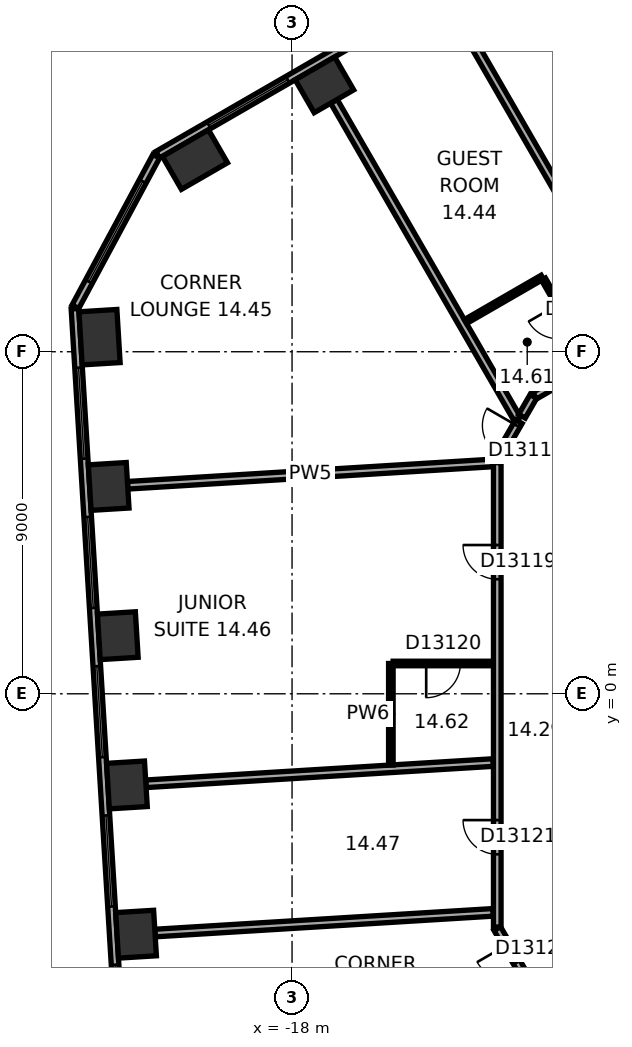
"""IFC4 building model, lengths in metres.
Left out: names, types, materials, properties, quantities, classifications, styles, units other than length and angle.
Written with IfcOpenShell. Run it as: python <this file> out.ifc"""

import sys

from ifc_helpers import new_model, si_unit, direction, frame, frame_2d, origin, origin_2d, place, context, subcontext, project, spatial, rectangle, extrude, element, fill, save


model = new_model("IFC4")
c1 = context("Model", 3, precision=1e-05, world=origin(), true_north=direction((0.0, 1.0)))
c2 = subcontext(c1, "Body", "Model", "MODEL_VIEW")
j1 = project(units=[si_unit("LENGTHUNIT", "METRE"), si_unit("PLANEANGLEUNIT", "RADIAN")], contexts=[c1])
p1 = place(None, origin())
s1 = spatial("IfcSite", under=j1, at=p1, CompositionType="ELEMENT")
p2 = place(p1, origin())
s2 = spatial("IfcBuilding", under=s1, at=p2, CompositionType="ELEMENT")
p3 = place(p2, frame((0.0, 0.0, 67.1)))
s3 = spatial("IfcBuildingStorey", under=s2, at=p3, CompositionType="ELEMENT", Elevation=67.1)
p4 = place(p3, frame((-17.148, 16.023, 0.0), z_axis=(0.0, 0.0, 1.0), x_axis=(-0.866025403784, -0.5, 0.0)))
e1 = element("IfcColumn", 1, at=p4, inside=s3, PredefinedType="COLUMN", context=c2, shape_type="SweptSolid", body=[
    extrude(rectangle(XDim=1.2, YDim=1.0, at=origin_2d()), origin(), (0.0, 0.0, 1.0), 3.3),
])
for number, where, z_axis, x_axis in (
    (2, (-20.555, 14.055, 0.0), (0.0, 0.0, 1.0), (-0.866, -0.5, 0.0)),
    (3, (-23.066, 9.383, 0.0), (0.0, 0.0, 1.0), (0.061, -0.998, 0.0)),
):
    element("IfcColumn", number, at=place(p3, frame(where, z_axis=z_axis, x_axis=x_axis)), inside=s3, PredefinedType="COLUMN", context=c2, shape_type="SweptSolid", body=[
        extrude(rectangle(XDim=1.4, YDim=1.0, at=origin_2d()), origin(), (0.0, 0.0, 1.0), 3.3),
    ])
for number, where, z_axis, x_axis in (
    (4, (-22.826, 5.456, 0.0), (0.0, 0.0, 1.0), (0.061, -0.998, 0.0)),
    (5, (-22.585, 1.529, 0.0), (0.0, 0.0, 1.0), (0.061, -0.998, 0.0)),
    (6, (-22.345, -2.399, 0.0), (0.0, 0.0, 1.0), (0.061, -0.998, 0.0)),
    (7, (-22.105, -6.326, 0.0), (0.0, 0.0, 1.0), (0.061, -0.998, 0.0)),
):
    element("IfcColumn", number, at=place(p3, frame(where, z_axis=z_axis, x_axis=x_axis)), inside=s3, PredefinedType="COLUMN", context=c2, shape_type="SweptSolid", body=[
        extrude(rectangle(XDim=1.2, YDim=1.0, at=origin_2d()), origin(), (0.0, 0.0, 1.0), 3.3),
    ])
p5 = place(p3, frame((-3.136, 24.805, 0.0), z_axis=(0.0, 0.0, 1.0), x_axis=(-0.866028291626, -0.499994998079, 0.0)))
e8 = element("IfcWall", 8, at=p5, inside=s3, PredefinedType="STANDARD", context=c2, shape_type="SweptSolid", body=[
    extrude(rectangle(XDim=21.246, YDim=0.2, at=frame_2d((10.623, 0.0))), origin(), (0.0, 0.0, 1.0), 3.3),
])
p6 = place(p5, frame((1.555, 0.0, 0.8)))
e9 = element("IfcOpeningElement", 9, at=p6, cuts=e8, PredefinedType="OPENING", context=c2, shape_type="SweptSolid", body=[
    extrude(rectangle(XDim=2.4, YDim=1.7, at=frame_2d((1.2, 0.85))), frame((0.0, 0.11, 0.0), z_axis=(0.0, -1.0, 0.0), x_axis=(1.0, 0.0, 0.0)), (0.0, 0.0, 1.0), 0.22),
])
p7 = place(p5, frame((5.489, 0.0, 0.8)))
e10 = element("IfcOpeningElement", 10, at=p7, cuts=e8, PredefinedType="OPENING", context=c2, shape_type="SweptSolid", body=[
    extrude(rectangle(XDim=2.4, YDim=1.7, at=frame_2d((1.2, 0.85))), frame((0.0, 0.11, 0.0), z_axis=(0.0, -1.0, 0.0), x_axis=(1.0, 0.0, 0.0)), (0.0, 0.0, 1.0), 0.22),
])
p8 = place(p5, frame((9.424, 0.0, 0.8)))
e11 = element("IfcOpeningElement", 11, at=p8, cuts=e8, PredefinedType="OPENING", context=c2, shape_type="SweptSolid", body=[
    extrude(rectangle(XDim=2.4, YDim=1.7, at=frame_2d((1.2, 0.85))), frame((0.0, 0.11, 0.0), z_axis=(0.0, -1.0, 0.0), x_axis=(1.0, 0.0, 0.0)), (0.0, 0.0, 1.0), 0.22),
])
p9 = place(p5, frame((13.358, 0.0, 0.8)))
e12 = element("IfcOpeningElement", 12, at=p9, cuts=e8, PredefinedType="OPENING", context=c2, shape_type="SweptSolid", body=[
    extrude(rectangle(XDim=2.4, YDim=1.7, at=frame_2d((1.2, 0.85))), frame((0.0, 0.11, 0.0), z_axis=(0.0, -1.0, 0.0), x_axis=(1.0, 0.0, 0.0)), (0.0, 0.0, 1.0), 0.22),
])
p10 = place(p5, frame((17.293, 0.0, 0.8)))
e13 = element("IfcOpeningElement", 13, at=p10, cuts=e8, PredefinedType="OPENING", context=c2, shape_type="SweptSolid", body=[
    extrude(rectangle(XDim=2.4, YDim=1.7, at=frame_2d((1.2, 0.85))), frame((0.0, 0.11, 0.0), z_axis=(0.0, -1.0, 0.0), x_axis=(1.0, 0.0, 0.0)), (0.0, 0.0, 1.0), 0.22),
])
p11 = place(p3, frame((-21.574, 14.143, 0.0), z_axis=(0.0, 0.0, 1.0), x_axis=(-0.473292949472, -0.880905093628, 0.0)))
e14 = element("IfcWall", 14, at=p11, inside=s3, PredefinedType="STANDARD", context=c2, shape_type="SweptSolid", body=[
    extrude(rectangle(XDim=4.494, YDim=0.2, at=frame_2d((2.247, 0.0))), origin(), (0.0, 0.0, 1.0), 3.3),
])
p12 = place(p11, frame((0.747, 0.0, 0.8)))
e15 = element("IfcOpeningElement", 15, at=p12, cuts=e14, PredefinedType="OPENING", context=c2, shape_type="SweptSolid", body=[
    extrude(rectangle(XDim=3.0, YDim=1.7, at=frame_2d((1.5, 0.85))), frame((0.0, 0.11, 0.0), z_axis=(0.0, -1.0, 0.0), x_axis=(1.0, 0.0, 0.0)), (0.0, 0.0, 1.0), 0.22),
])
p13 = place(p3, frame((-23.713, 10.131, 0.0), z_axis=(0.0, 0.0, 1.0), x_axis=(0.061040439785, -0.998135293791, 0.0)))
e16 = element("IfcWall", 16, at=p13, inside=s3, PredefinedType="STANDARD", context=c2, shape_type="SweptSolid", body=[
    extrude(rectangle(XDim=21.246, YDim=0.2, at=frame_2d((10.623, 0.0))), origin(), (0.0, 0.0, 1.0), 3.3),
])
p14 = place(p13, frame((1.553, 0.0, 0.8)))
e17 = element("IfcOpeningElement", 17, at=p14, cuts=e16, PredefinedType="OPENING", context=c2, shape_type="SweptSolid", body=[
    extrude(rectangle(XDim=2.4, YDim=1.7, at=frame_2d((1.2, 0.85))), frame((0.0, 0.11, 0.0), z_axis=(0.0, -1.0, 0.0), x_axis=(1.0, 0.0, 0.0)), (0.0, 0.0, 1.0), 0.22),
])
p15 = place(p13, frame((5.488, 0.0, 0.8)))
e18 = element("IfcOpeningElement", 18, at=p15, cuts=e16, PredefinedType="OPENING", context=c2, shape_type="SweptSolid", body=[
    extrude(rectangle(XDim=2.4, YDim=1.7, at=frame_2d((1.2, 0.85))), frame((0.0, 0.11, 0.0), z_axis=(0.0, -1.0, 0.0), x_axis=(1.0, 0.0, 0.0)), (0.0, 0.0, 1.0), 0.22),
])
p16 = place(p13, frame((9.422, 0.0, 0.8)))
e19 = element("IfcOpeningElement", 19, at=p16, cuts=e16, PredefinedType="OPENING", context=c2, shape_type="SweptSolid", body=[
    extrude(rectangle(XDim=2.4, YDim=1.7, at=frame_2d((1.2, 0.85))), frame((0.0, 0.11, 0.0), z_axis=(0.0, -1.0, 0.0), x_axis=(1.0, 0.0, 0.0)), (0.0, 0.0, 1.0), 0.22),
])
p17 = place(p13, frame((13.357, 0.0, 0.8)))
e20 = element("IfcOpeningElement", 20, at=p17, cuts=e16, PredefinedType="OPENING", context=c2, shape_type="SweptSolid", body=[
    extrude(rectangle(XDim=2.4, YDim=1.7, at=frame_2d((1.2, 0.85))), frame((0.0, 0.11, 0.0), z_axis=(0.0, -1.0, 0.0), x_axis=(1.0, 0.0, 0.0)), (0.0, 0.0, 1.0), 0.22),
])
p18 = place(p13, frame((17.292, 0.0, 0.8)))
e21 = element("IfcOpeningElement", 21, at=p18, cuts=e16, PredefinedType="OPENING", context=c2, shape_type="SweptSolid", body=[
    extrude(rectangle(XDim=2.4, YDim=1.7, at=frame_2d((1.2, 0.85))), frame((0.0, 0.11, 0.0), z_axis=(0.0, -1.0, 0.0), x_axis=(1.0, 0.0, 0.0)), (0.0, 0.0, 1.0), 0.22),
])
p19 = place(p3, frame((-22.327, 5.486, 0.0), z_axis=(0.0, 0.0, 1.0), x_axis=(0.998135194863, 0.061042057435, 0.0)))
e22 = element("IfcWall", 22, at=p19, inside=s3, PredefinedType="PARTITIONING", context=c2, shape_type="SweptSolid", body=[
    extrude(rectangle(XDim=9.635, YDim=0.2, at=frame_2d((4.817, 0.0))), origin(), (0.0, 0.0, 1.0), 3.05),
])
p20 = place(p3, frame((-21.846, -2.368, 0.0), z_axis=(0.0, 0.0, 1.0), x_axis=(0.998134617584, 0.061051496129, 0.0)))
e23 = element("IfcWall", 23, at=p20, inside=s3, PredefinedType="PARTITIONING", context=c2, shape_type="SweptSolid", body=[
    extrude(rectangle(XDim=9.154, YDim=0.2, at=frame_2d((4.577, 0.0))), origin(), (0.0, 0.0, 1.0), 3.05),
])
p21 = place(p3, frame((-21.606, -6.295, 0.0), z_axis=(0.0, 0.0, 1.0), x_axis=(0.998134305525, 0.061056597794, 0.0)))
e24 = element("IfcWall", 24, at=p21, inside=s3, PredefinedType="PARTITIONING", context=c2, shape_type="SweptSolid", body=[
    extrude(rectangle(XDim=8.913, YDim=0.2, at=frame_2d((4.457, 0.0))), origin(), (0.0, 0.0, 1.0), 2.6),
])
p22 = place(p3, frame((-16.898, 15.59, 0.0), z_axis=(0.0, 0.0, 1.0), x_axis=(0.499994742786, -0.866028439017, 0.0)))
e25 = element("IfcWall", 25, at=p22, inside=s3, PredefinedType="PARTITIONING", context=c2, shape_type="SweptSolid", body=[
    extrude(rectangle(XDim=9.65, YDim=0.2, at=frame_2d((4.825, 0.0))), origin(), (0.0, 0.0, 1.0), 3.05),
])
p23 = place(p3, frame((-15.4, -1.874, 0.0), z_axis=(0.0, 0.0, 1.0), x_axis=(0.0, 1.0, 0.0)))
e26 = element("IfcWall", 26, at=p23, inside=s3, PredefinedType="PARTITIONING", context=c2, shape_type="SweptSolid", body=[
    extrude(rectangle(XDim=2.671, YDim=0.12, at=frame_2d((1.335, 0.0))), origin(), (0.0, 0.0, 1.0), 3.05),
])
p24 = place(p3, frame((-15.34, 0.797, 0.0), z_axis=(0.0, 0.0, 1.0), x_axis=(1.0, 0.0, 0.0)))
e27 = element("IfcWall", 27, at=p24, inside=s3, PredefinedType="PARTITIONING", context=c2, shape_type="SweptSolid", body=[
    extrude(rectangle(XDim=2.64, YDim=0.12, at=frame_2d((1.32, 0.0))), origin(), (0.0, 0.0, 1.0), 2.6),
])
p25 = place(p24, frame((0.87, 0.0, 0.0)))
e28 = element("IfcOpeningElement", 28, at=p25, cuts=e27, PredefinedType="OPENING", context=c2, shape_type="SweptSolid", body=[
    extrude(rectangle(XDim=0.9, YDim=2.1, at=frame_2d((0.45, 1.05))), frame((0.0, 0.07, 0.0), z_axis=(0.0, -1.0, 0.0), x_axis=(1.0, 0.0, 0.0)), (0.0, 0.0, 1.0), 0.14),
])
p26 = place(p3, frame((-13.436, 9.794, 0.0), z_axis=(0.0, 0.0, 1.0), x_axis=(0.866053246676, 0.499951771596, 0.0)))
e29 = element("IfcWall", 29, at=p26, inside=s3, PredefinedType="PARTITIONING", context=c2, shape_type="SweptSolid", body=[
    extrude(rectangle(XDim=2.335, YDim=0.12, at=frame_2d((1.167, 0.0))), origin(), (0.0, 0.0, 1.0), 3.05),
])
p27 = place(p3, frame((-12.6, -6.177, 0.0), z_axis=(0.0, 0.0, 1.0), x_axis=(0.500063520245, -0.865988727248, 0.0)))
e30 = element("IfcWall", 30, at=p27, inside=s3, PredefinedType="PARTITIONING", context=c2, shape_type="SweptSolid", body=[
    extrude(rectangle(XDim=1.9, YDim=0.2, at=frame_2d((0.95, 0.0))), origin(), (0.0, 0.0, 1.0), 3.05),
])
p28 = place(p27, frame((0.5, 0.0, 0.0)))
e31 = element("IfcOpeningElement", 31, at=p28, cuts=e30, PredefinedType="OPENING", context=c2, shape_type="SweptSolid", body=[
    extrude(rectangle(XDim=0.9, YDim=2.1, at=frame_2d((0.45, 1.05))), frame((0.0, 0.11, 0.0), z_axis=(0.0, -1.0, 0.0), x_axis=(1.0, 0.0, 0.0)), (0.0, 0.0, 1.0), 0.22),
])
p29 = place(p3, frame((-12.6, 6.081, 0.0), z_axis=(0.0, 0.0, 1.0), x_axis=(0.0, -1.0, 0.0)))
e32 = element("IfcWall", 32, at=p29, inside=s3, PredefinedType="PARTITIONING", context=c2, shape_type="SweptSolid", body=[
    extrude(rectangle(XDim=12.219, YDim=0.2, at=frame_2d((6.109, 0.0))), origin(), (0.0, 0.0, 1.0), 3.05),
])
p30 = place(p29, frame((2.167, 0.0, 0.0)))
e33 = element("IfcOpeningElement", 33, at=p30, cuts=e32, PredefinedType="OPENING", context=c2, shape_type="SweptSolid", body=[
    extrude(rectangle(XDim=0.9, YDim=2.1, at=frame_2d((0.45, 1.05))), frame((0.0, 0.11, 0.0), z_axis=(0.0, -1.0, 0.0), x_axis=(1.0, 0.0, 0.0)), (0.0, 0.0, 1.0), 0.22),
])
p31 = place(p29, frame((9.405, 0.0, 0.0)))
e34 = element("IfcOpeningElement", 34, at=p31, cuts=e32, PredefinedType="OPENING", context=c2, shape_type="SweptSolid", body=[
    extrude(rectangle(XDim=0.9, YDim=2.1, at=frame_2d((0.45, 1.05))), frame((0.0, 0.11, 0.0), z_axis=(0.0, -1.0, 0.0), x_axis=(1.0, 0.0, 0.0)), (0.0, 0.0, 1.0), 0.22),
])
p32 = place(p3, frame((-12.032, 7.162, 0.0), z_axis=(0.0, 0.0, 1.0), x_axis=(-0.499951829968, -0.866053212979, 0.0)))
e35 = element("IfcWall", 35, at=p32, inside=s3, PredefinedType="PARTITIONING", context=c2, shape_type="SweptSolid", body=[
    extrude(rectangle(XDim=1.136, YDim=0.2, at=frame_2d((0.568, 0.0))), origin(), (0.0, 0.0, 1.0), 3.05),
])
p33 = place(p32, frame((0.118, 0.0, 0.0)))
e36 = element("IfcOpeningElement", 36, at=p33, cuts=e35, PredefinedType="OPENING", context=c2, shape_type="SweptSolid", body=[
    extrude(rectangle(XDim=0.9, YDim=2.1, at=frame_2d((0.45, 1.05))), frame((0.0, 0.11, 0.0), z_axis=(0.0, -1.0, 0.0), x_axis=(1.0, 0.0, 0.0)), (0.0, 0.0, 1.0), 0.22),
])
p34 = place(p3, frame((-11.65, 7.823, 0.0), z_axis=(0.0, 0.0, 1.0), x_axis=(-0.50012165622, -0.865955154139, 0.0)))
e37 = element("IfcWall", 37, at=p34, inside=s3, PredefinedType="PARTITIONING", context=c2, shape_type="SweptSolid", body=[
    extrude(rectangle(XDim=0.6, YDim=0.2, at=frame_2d((0.3, 0.0))), origin(), (0.0, 0.0, 1.0), 3.05),
])
p35 = place(p3, frame((-11.385, 10.909, 0.0), z_axis=(0.0, 0.0, 1.0), x_axis=(0.500077547548, -0.865980627057, 0.0)))
e38 = element("IfcWall", 38, at=p35, inside=s3, PredefinedType="PARTITIONING", context=c2, shape_type="SweptSolid", body=[
    extrude(rectangle(XDim=2.44, YDim=0.12, at=frame_2d((1.22, 0.0))), origin(), (0.0, 0.0, 1.0), 3.05),
])
p36 = place(p35, frame((0.77, 0.0, 0.0)))
e39 = element("IfcOpeningElement", 39, at=p36, cuts=e38, PredefinedType="OPENING", context=c2, shape_type="SweptSolid", body=[
    extrude(rectangle(XDim=0.9, YDim=2.1, at=frame_2d((0.45, 1.05))), frame((0.0, 0.07, 0.0), z_axis=(0.0, -1.0, 0.0), x_axis=(1.0, 0.0, 0.0)), (0.0, 0.0, 1.0), 0.14),
])
p37 = place(p3, frame((-8.902, 9.41, 0.0), z_axis=(0.0, 0.0, 1.0), x_axis=(-0.866014299198, -0.500019233215, 0.0)))
e40 = element("IfcWall", 40, at=p37, inside=s3, PredefinedType="PARTITIONING", context=c2, shape_type="SweptSolid", body=[
    extrude(rectangle(XDim=3.133, YDim=0.2, at=frame_2d((1.567, 0.0))), origin(), (0.0, 0.0, 1.0), 3.05),
])
p38 = place(p37, frame((0.225, 0.0, 0.0)))
e41 = element("IfcOpeningElement", 41, at=p38, cuts=e40, PredefinedType="OPENING", context=c2, shape_type="SweptSolid", body=[
    extrude(rectangle(XDim=0.9, YDim=2.1, at=frame_2d((0.45, 1.05))), frame((0.0, 0.11, 0.0), z_axis=(0.0, -1.0, 0.0), x_axis=(1.0, 0.0, 0.0)), (0.0, 0.0, 1.0), 0.22),
])
p39 = place(p3, frame((-7.865, 7.814, 0.0), z_axis=(0.0, 0.0, 1.0), x_axis=(-0.500004234368, 0.866022959057, 0.0)))
e42 = element("IfcWall", 42, at=p39, inside=s3, PredefinedType="PARTITIONING", context=c2, shape_type="SweptSolid", body=[
    extrude(rectangle(XDim=11.25, YDim=0.2, at=frame_2d((5.625, 0.0))), origin(), (0.0, 0.0, 1.0), 3.05),
])
p40 = place(p39, frame((0.5, 0.0, 0.0)))
e43 = element("IfcOpeningElement", 43, at=p40, cuts=e42, PredefinedType="OPENING", context=c2, shape_type="SweptSolid", body=[
    extrude(rectangle(XDim=0.9, YDim=2.1, at=frame_2d((0.45, 1.05))), frame((0.0, 0.11, 0.0), z_axis=(0.0, -1.0, 0.0), x_axis=(1.0, 0.0, 0.0)), (0.0, 0.0, 1.0), 0.22),
])
p41 = place(p10, origin())
e44 = element("IfcWindow", 44, at=p41, inside=s3, PartitioningType="SINGLE_PANEL", PredefinedType="WINDOW", context=c2, shape_type="SweptSolid", body=[
    extrude(rectangle(XDim=2.4, YDim=1.7, at=frame_2d((1.2, 0.85))), frame((0.0, 0.03, 0.0), z_axis=(0.0, -1.0, 0.0), x_axis=(1.0, 0.0, 0.0)), (0.0, 0.0, 1.0), 0.06),
])
fill(e13, e44)
p42 = place(p12, origin())
e45 = element("IfcWindow", 45, at=p42, inside=s3, PartitioningType="SINGLE_PANEL", PredefinedType="WINDOW", context=c2, shape_type="SweptSolid", body=[
    extrude(rectangle(XDim=3.0, YDim=1.7, at=frame_2d((1.5, 0.85))), frame((0.0, 0.03, 0.0), z_axis=(0.0, -1.0, 0.0), x_axis=(1.0, 0.0, 0.0)), (0.0, 0.0, 1.0), 0.06),
])
fill(e15, e45)
p43 = place(p14, origin())
e46 = element("IfcWindow", 46, at=p43, inside=s3, PartitioningType="SINGLE_PANEL", PredefinedType="WINDOW", context=c2, shape_type="SweptSolid", body=[
    extrude(rectangle(XDim=2.4, YDim=1.7, at=frame_2d((1.2, 0.85))), frame((0.0, 0.03, 0.0), z_axis=(0.0, -1.0, 0.0), x_axis=(1.0, 0.0, 0.0)), (0.0, 0.0, 1.0), 0.06),
])
fill(e17, e46)
p44 = place(p15, origin())
e47 = element("IfcWindow", 47, at=p44, inside=s3, PartitioningType="SINGLE_PANEL", PredefinedType="WINDOW", context=c2, shape_type="SweptSolid", body=[
    extrude(rectangle(XDim=2.4, YDim=1.7, at=frame_2d((1.2, 0.85))), frame((0.0, 0.03, 0.0), z_axis=(0.0, -1.0, 0.0), x_axis=(1.0, 0.0, 0.0)), (0.0, 0.0, 1.0), 0.06),
])
fill(e18, e47)
p45 = place(p16, origin())
e48 = element("IfcWindow", 48, at=p45, inside=s3, PartitioningType="SINGLE_PANEL", PredefinedType="WINDOW", context=c2, shape_type="SweptSolid", body=[
    extrude(rectangle(XDim=2.4, YDim=1.7, at=frame_2d((1.2, 0.85))), frame((0.0, 0.03, 0.0), z_axis=(0.0, -1.0, 0.0), x_axis=(1.0, 0.0, 0.0)), (0.0, 0.0, 1.0), 0.06),
])
fill(e19, e48)
p46 = place(p17, origin())
e49 = element("IfcWindow", 49, at=p46, inside=s3, PartitioningType="SINGLE_PANEL", PredefinedType="WINDOW", context=c2, shape_type="SweptSolid", body=[
    extrude(rectangle(XDim=2.4, YDim=1.7, at=frame_2d((1.2, 0.85))), frame((0.0, 0.03, 0.0), z_axis=(0.0, -1.0, 0.0), x_axis=(1.0, 0.0, 0.0)), (0.0, 0.0, 1.0), 0.06),
])
fill(e20, e49)
p47 = place(p18, origin())
e50 = element("IfcWindow", 50, at=p47, inside=s3, PartitioningType="SINGLE_PANEL", PredefinedType="WINDOW", context=c2, shape_type="SweptSolid", body=[
    extrude(rectangle(XDim=2.4, YDim=1.7, at=frame_2d((1.2, 0.85))), frame((0.0, 0.03, 0.0), z_axis=(0.0, -1.0, 0.0), x_axis=(1.0, 0.0, 0.0)), (0.0, 0.0, 1.0), 0.06),
])
fill(e21, e50)
p48 = place(p33, origin())
e51 = element("IfcDoor", 51, at=p48, inside=s3, OperationType="SINGLE_SWING_LEFT", PredefinedType="DOOR", context=c2, shape_type="SweptSolid", body=[
    extrude(rectangle(XDim=0.9, YDim=2.1, at=frame_2d((0.45, 1.05))), frame((0.0, 0.025, 0.0), z_axis=(0.0, -1.0, 0.0), x_axis=(1.0, 0.0, 0.0)), (0.0, 0.0, 1.0), 0.05),
])
fill(e36, e51)
p49 = place(p30, origin())
e52 = element("IfcDoor", 52, at=p49, inside=s3, OperationType="SINGLE_SWING_LEFT", PredefinedType="DOOR", context=c2, shape_type="SweptSolid", body=[
    extrude(rectangle(XDim=0.9, YDim=2.1, at=frame_2d((0.45, 1.05))), frame((0.0, 0.025, 0.0), z_axis=(0.0, -1.0, 0.0), x_axis=(1.0, 0.0, 0.0)), (0.0, 0.0, 1.0), 0.05),
])
fill(e33, e52)
p50 = place(p25, origin())
e53 = element("IfcDoor", 53, at=p50, inside=s3, OperationType="SINGLE_SWING_LEFT", PredefinedType="DOOR", context=c2, shape_type="SweptSolid", body=[
    extrude(rectangle(XDim=0.9, YDim=2.1, at=frame_2d((0.45, 1.05))), frame((0.0, 0.025, 0.0), z_axis=(0.0, -1.0, 0.0), x_axis=(1.0, 0.0, 0.0)), (0.0, 0.0, 1.0), 0.05),
])
fill(e28, e53)
p51 = place(p31, origin())
e54 = element("IfcDoor", 54, at=p51, inside=s3, OperationType="SINGLE_SWING_LEFT", PredefinedType="DOOR", context=c2, shape_type="SweptSolid", body=[
    extrude(rectangle(XDim=0.9, YDim=2.1, at=frame_2d((0.45, 1.05))), frame((0.0, 0.025, 0.0), z_axis=(0.0, -1.0, 0.0), x_axis=(1.0, 0.0, 0.0)), (0.0, 0.0, 1.0), 0.05),
])
fill(e34, e54)
p52 = place(p28, origin())
e55 = element("IfcDoor", 55, at=p52, inside=s3, OperationType="SINGLE_SWING_LEFT", PredefinedType="DOOR", context=c2, shape_type="SweptSolid", body=[
    extrude(rectangle(XDim=0.9, YDim=2.1, at=frame_2d((0.45, 1.05))), frame((0.0, 0.025, 0.0), z_axis=(0.0, -1.0, 0.0), x_axis=(1.0, 0.0, 0.0)), (0.0, 0.0, 1.0), 0.05),
])
fill(e31, e55)
save(model, sys.argv[1])
